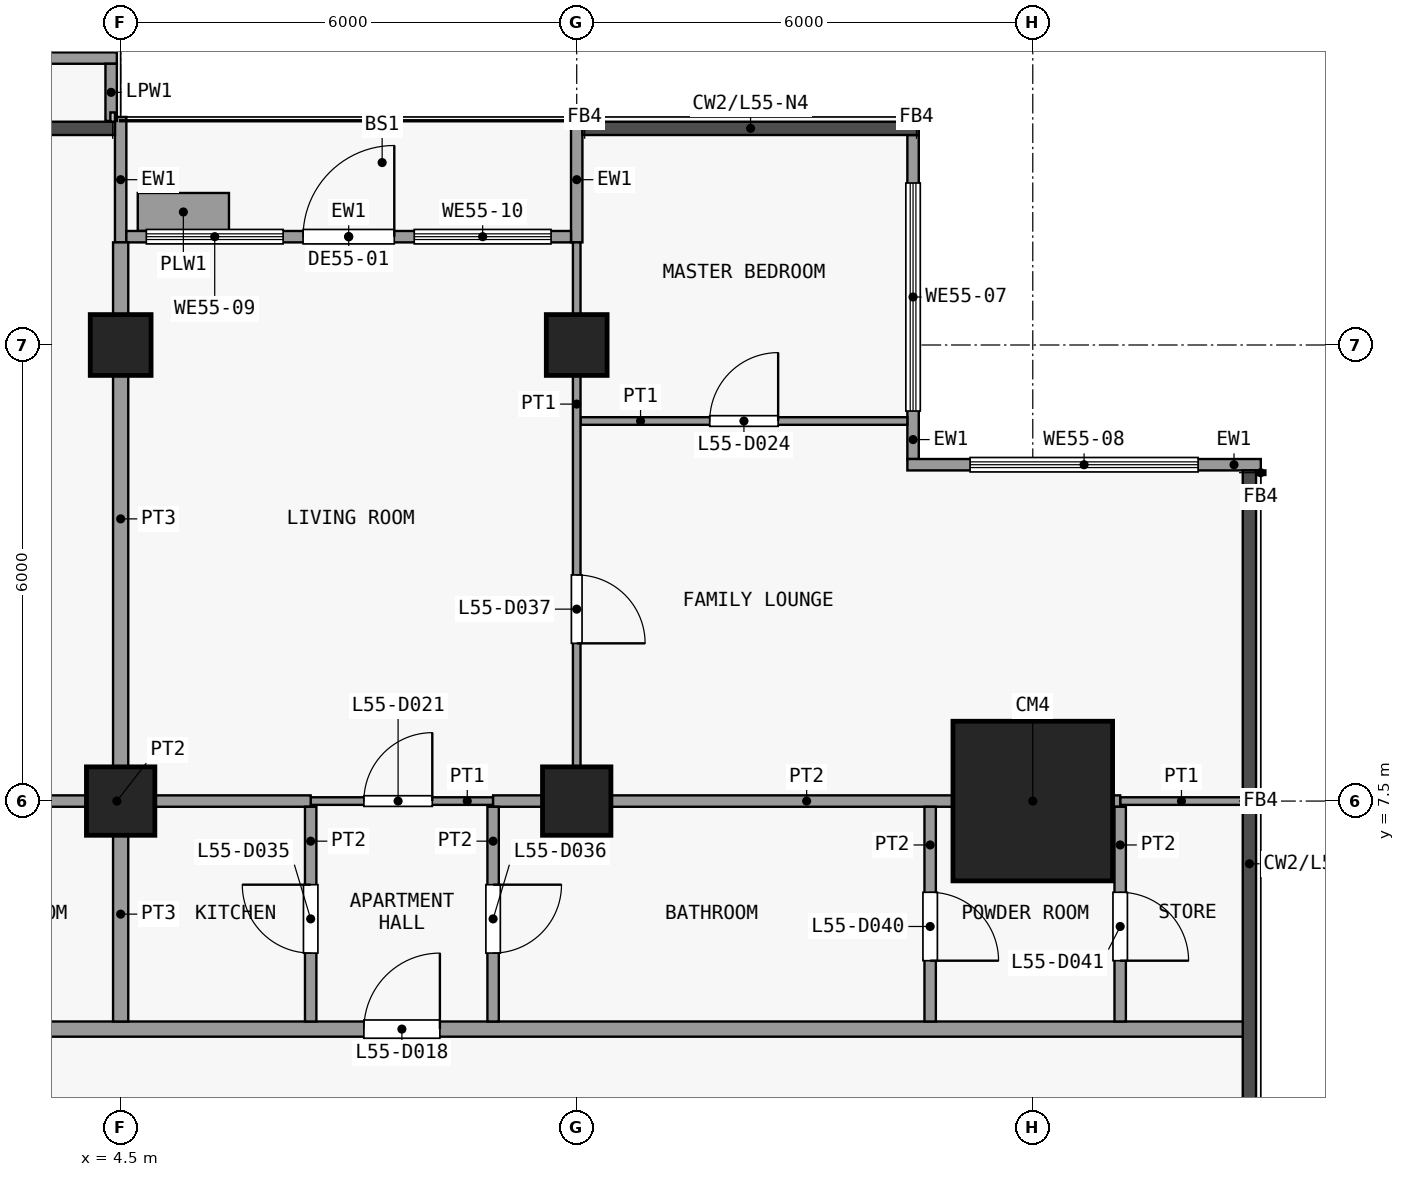
"""IFC4 building model, lengths in metres.
Left out: names, types, materials, properties, quantities, classifications, styles, units other than length and angle.
Written with IfcOpenShell. Run it as: python <this file> out.ifc"""

import sys

from ifc_helpers import new_model, si_unit, direction, frame, frame_2d, origin, origin_2d, place, context, subcontext, project, spatial, rectangle, extrude, element, fill, save


model = new_model("IFC4")
c1 = context("Model", 3, precision=1e-05, world=origin(), true_north=direction((0.0, 1.0)))
c2 = subcontext(c1, "Body", "Model", "MODEL_VIEW")
j1 = project(units=[si_unit("LENGTHUNIT", "METRE"), si_unit("PLANEANGLEUNIT", "RADIAN")], contexts=[c1])
p1 = place(None, origin())
s1 = spatial("IfcSite", under=j1, at=p1, CompositionType="ELEMENT")
p2 = place(p1, origin())
s2 = spatial("IfcBuilding", under=s1, at=p2, CompositionType="ELEMENT")
p3 = place(p2, frame((0.0, 0.0, 219.5)))
s3 = spatial("IfcBuildingStorey", under=s2, at=p3, CompositionType="ELEMENT", Elevation=219.5)
p4 = place(p3, frame((4.5, 7.5, 0.0), z_axis=(0.0, 0.0, 1.0), x_axis=(1.0, 0.0, 0.0)))
e1 = element("IfcColumn", 1, at=p4, inside=s3, PredefinedType="COLUMN", context=c2, shape_type="SweptSolid", body=[
    extrude(rectangle(XDim=0.9, YDim=0.9, at=origin_2d()), origin(), (0.0, 0.0, 1.0), 3.6),
])
p5 = place(p3, frame((4.5, 13.5, 0.0), z_axis=(0.0, 0.0, 1.0), x_axis=(1.0, 0.0, 0.0)))
e2 = element("IfcColumn", 2, at=p5, inside=s3, PredefinedType="COLUMN", context=c2, shape_type="SweptSolid", body=[
    extrude(rectangle(XDim=0.8, YDim=0.8, at=origin_2d()), origin(), (0.0, 0.0, 1.0), 3.6),
])
p6 = place(p3, frame((10.5, 7.5, 0.0), z_axis=(0.0, 0.0, 1.0), x_axis=(1.0, 0.0, 0.0)))
e3 = element("IfcColumn", 3, at=p6, inside=s3, PredefinedType="COLUMN", context=c2, shape_type="SweptSolid", body=[
    extrude(rectangle(XDim=0.9, YDim=0.9, at=origin_2d()), origin(), (0.0, 0.0, 1.0), 3.6),
])
p7 = place(p3, frame((10.5, 13.5, 0.0), z_axis=(0.0, 0.0, 1.0), x_axis=(1.0, 0.0, 0.0)))
e4 = element("IfcColumn", 4, at=p7, inside=s3, PredefinedType="COLUMN", context=c2, shape_type="SweptSolid", body=[
    extrude(rectangle(XDim=0.8, YDim=0.8, at=origin_2d()), origin(), (0.0, 0.0, 1.0), 3.6),
])
p8 = place(p3, frame((16.5, 7.5, 0.0), z_axis=(0.0, 0.0, 1.0), x_axis=(1.0, 0.0, 0.0)))
e5 = element("IfcColumn", 5, at=p8, inside=s3, PredefinedType="COLUMN", context=c2, shape_type="SweptSolid", body=[
    extrude(rectangle(XDim=2.1, YDim=2.1, at=origin_2d()), origin(), (0.0, 0.0, 1.0), 3.6),
])
p9 = place(p3, frame((14.925, 16.262, 0.0), z_axis=(0.0, 0.0, 1.0), x_axis=(0.0, -1.0, 0.0)))
e6 = element("IfcWall", 6, at=p9, inside=s3, PredefinedType="SOLIDWALL", context=c2, shape_type="SweptSolid", body=[
    extrude(rectangle(XDim=4.262, YDim=0.15, at=frame_2d((2.131, 0.0))), origin(), (0.0, 0.0, 1.0), 3.3),
])
p10 = place(p9, frame((0.631, 0.0, 0.9)))
e7 = element("IfcOpeningElement", 7, at=p10, cuts=e6, PredefinedType="OPENING", context=c2, shape_type="SweptSolid", body=[
    extrude(rectangle(XDim=3.0, YDim=2.4, at=frame_2d((1.5, 1.2))), frame((0.0, 0.085, 0.0), z_axis=(0.0, -1.0, 0.0), x_axis=(1.0, 0.0, 0.0)), (0.0, 0.0, 1.0), 0.17),
])
p11 = place(p3, frame((14.85, 11.925, 0.0), z_axis=(0.0, 0.0, 1.0), x_axis=(1.0, 0.0, 0.0)))
e8 = element("IfcWall", 8, at=p11, inside=s3, PredefinedType="SOLIDWALL", context=c2, shape_type="SweptSolid", body=[
    extrude(rectangle(XDim=4.65, YDim=0.15, at=frame_2d((2.325, 0.0))), origin(), (0.0, 0.0, 1.0), 3.3),
])
p12 = place(p11, frame((0.825, 0.0, 0.9)))
e9 = element("IfcOpeningElement", 9, at=p12, cuts=e8, PredefinedType="OPENING", context=c2, shape_type="SweptSolid", body=[
    extrude(rectangle(XDim=3.0, YDim=2.4, at=frame_2d((1.5, 1.2))), frame((0.0, 0.085, 0.0), z_axis=(0.0, -1.0, 0.0), x_axis=(1.0, 0.0, 0.0)), (0.0, 0.0, 1.0), 0.17),
])
for number, where, z_axis, x_axis in (
    (10, (4.5, 14.85, 0.0), (0.0, 0.0, 1.0), (0.0, 1.0, 0.0)),
    (11, (10.5, 14.85, 0.0), (0.0, 0.0, 1.0), (0.0, 1.0, 0.0)),
):
    element("IfcWall", number, at=place(p3, frame(where, z_axis=z_axis, x_axis=x_axis)), inside=s3, PredefinedType="SOLIDWALL", context=c2, shape_type="SweptSolid", body=[
        extrude(rectangle(XDim=1.65, YDim=0.15, at=frame_2d((0.825, 0.0))), origin(), (0.0, 0.0, 1.0), 3.3),
    ])
p13 = place(p3, frame((4.575, 14.925, 0.0), z_axis=(0.0, 0.0, 1.0), x_axis=(1.0, 0.0, 0.0)))
e12 = element("IfcWall", 12, at=p13, inside=s3, PredefinedType="SOLIDWALL", context=c2, shape_type="SweptSolid", body=[
    extrude(rectangle(XDim=5.85, YDim=0.15, at=frame_2d((2.925, 0.0))), origin(), (0.0, 0.0, 1.0), 3.3),
])
p14 = place(p13, frame((2.325, 0.0, 0.0)))
e13 = element("IfcOpeningElement", 13, at=p14, cuts=e12, PredefinedType="OPENING", context=c2, shape_type="SweptSolid", body=[
    extrude(rectangle(XDim=1.2, YDim=2.4, at=frame_2d((0.6, 1.2))), frame((0.0, 0.085, 0.0), z_axis=(0.0, -1.0, 0.0), x_axis=(1.0, 0.0, 0.0)), (0.0, 0.0, 1.0), 0.17),
])
p15 = place(p13, frame((0.262, 0.0, 0.9)))
e14 = element("IfcOpeningElement", 14, at=p15, cuts=e12, PredefinedType="OPENING", context=c2, shape_type="SweptSolid", body=[
    extrude(rectangle(XDim=1.8, YDim=2.1, at=frame_2d((0.9, 1.05))), frame((0.0, 0.085, 0.0), z_axis=(0.0, -1.0, 0.0), x_axis=(1.0, 0.0, 0.0)), (0.0, 0.0, 1.0), 0.17),
])
p16 = place(p13, frame((3.788, 0.0, 0.9)))
e15 = element("IfcOpeningElement", 15, at=p16, cuts=e12, PredefinedType="OPENING", context=c2, shape_type="SweptSolid", body=[
    extrude(rectangle(XDim=1.8, YDim=2.1, at=frame_2d((0.9, 1.05))), frame((0.0, 0.085, 0.0), z_axis=(0.0, -1.0, 0.0), x_axis=(1.0, 0.0, 0.0)), (0.0, 0.0, 1.0), 0.17),
])
p17 = place(p3, frame((4.725, 15.25, 0.0), z_axis=(0.0, 0.0, 1.0), x_axis=(1.0, 0.0, 0.0)))
e16 = element("IfcWall", 16, at=p17, inside=s3, PredefinedType="USERDEFINED", context=c2, shape_type="SweptSolid", body=[
    extrude(rectangle(XDim=1.2, YDim=0.5, at=frame_2d((0.6, 0.0))), origin(), (0.0, 0.0, 1.0), 0.9),
])
p18 = place(p3, frame((-4.552, 17.275, 0.0), z_axis=(0.0, 0.0, 1.0), x_axis=(1.0, 0.0, 0.0)))
e17 = element("IfcWall", 17, at=p18, inside=s3, PredefinedType="PARAPET", context=c2, shape_type="SweptSolid", body=[
    extrude(rectangle(XDim=9.002, YDim=0.15, at=frame_2d((4.501, 0.0))), origin(), (0.0, 0.0, 1.0), 1.15),
])
p19 = place(p3, frame((4.375, 17.2, 0.0), z_axis=(0.0, 0.0, 1.0), x_axis=(0.0, -1.0, 0.0)))
e18 = element("IfcWall", 18, at=p19, inside=s3, PredefinedType="PARAPET", context=c2, shape_type="SweptSolid", body=[
    extrude(rectangle(XDim=0.752, YDim=0.15, at=frame_2d((0.376, 0.0))), origin(), (0.0, 0.0, 1.0), 1.15),
])
p20 = place(p3, frame((-20.25, 4.5, 0.0), z_axis=(0.0, 0.0, 1.0), x_axis=(1.0, 0.0, 0.0)))
e19 = element("IfcWall", 19, at=p20, inside=s3, PredefinedType="PARTITIONING", context=c2, shape_type="SweptSolid", body=[
    extrude(rectangle(XDim=39.6, YDim=0.2, at=frame_2d((19.8, 0.0))), origin(), (0.0, 0.0, 1.0), 3.3),
])
p21 = place(p20, frame((5.45, 0.0, 0.0)))
e20 = element("IfcOpeningElement", 20, at=p21, cuts=e19, PredefinedType="OPENING", context=c2, shape_type="SweptSolid", body=[
    extrude(rectangle(XDim=1.0, YDim=2.1, at=frame_2d((0.5, 1.05))), frame((0.0, 0.11, 0.0), z_axis=(0.0, -1.0, 0.0), x_axis=(1.0, 0.0, 0.0)), (0.0, 0.0, 1.0), 0.22),
])
p22 = place(p20, frame((20.45, 0.0, 0.0)))
e21 = element("IfcOpeningElement", 21, at=p22, cuts=e19, PredefinedType="OPENING", context=c2, shape_type="SweptSolid", body=[
    extrude(rectangle(XDim=1.0, YDim=2.1, at=frame_2d((0.5, 1.05))), frame((0.0, 0.11, 0.0), z_axis=(0.0, -1.0, 0.0), x_axis=(1.0, 0.0, 0.0)), (0.0, 0.0, 1.0), 0.22),
])
p23 = place(p20, frame((27.95, 0.0, 0.0)))
e22 = element("IfcOpeningElement", 22, at=p23, cuts=e19, PredefinedType="OPENING", context=c2, shape_type="SweptSolid", body=[
    extrude(rectangle(XDim=1.0, YDim=2.1, at=frame_2d((0.5, 1.05))), frame((0.0, 0.11, 0.0), z_axis=(0.0, -1.0, 0.0), x_axis=(1.0, 0.0, 0.0)), (0.0, 0.0, 1.0), 0.22),
])
p24 = place(p3, frame((7.0, 7.5, 0.0), z_axis=(0.0, 0.0, 1.0), x_axis=(1.0, 0.0, 0.0)))
e23 = element("IfcWall", 23, at=p24, inside=s3, PredefinedType="PARTITIONING", context=c2, shape_type="SweptSolid", body=[
    extrude(rectangle(XDim=2.4, YDim=0.1, at=frame_2d((1.2, 0.0))), origin(), (0.0, 0.0, 1.0), 3.3),
])
p25 = place(p24, frame((0.7, 0.0, 0.0)))
e24 = element("IfcOpeningElement", 24, at=p25, cuts=e23, PredefinedType="OPENING", context=c2, shape_type="SweptSolid", body=[
    extrude(rectangle(XDim=0.9, YDim=2.1, at=frame_2d((0.45, 1.05))), frame((0.0, 0.06, 0.0), z_axis=(0.0, -1.0, 0.0), x_axis=(1.0, 0.0, 0.0)), (0.0, 0.0, 1.0), 0.12),
])
p26 = place(p3, frame((17.65, 7.5, 0.0), z_axis=(0.0, 0.0, 1.0), x_axis=(1.0, 0.0, 0.0)))
e25 = element("IfcWall", 25, at=p26, inside=s3, PredefinedType="PARTITIONING", context=c2, shape_type="SweptSolid", body=[
    extrude(rectangle(XDim=1.613, YDim=0.1, at=frame_2d((0.806, 0.0))), origin(), (0.0, 0.0, 1.0), 3.3),
])
p27 = place(p3, frame((1.9, 7.5, 0.0), z_axis=(0.0, 0.0, 1.0), x_axis=(1.0, 0.0, 0.0)))
e26 = element("IfcWall", 26, at=p27, inside=s3, PredefinedType="PARTITIONING", context=c2, shape_type="SweptSolid", body=[
    extrude(rectangle(XDim=5.1, YDim=0.15, at=frame_2d((2.55, 0.0))), origin(), (0.0, 0.0, 1.0), 3.3),
])
p28 = place(p3, frame((9.4, 7.5, 0.0), z_axis=(0.0, 0.0, 1.0), x_axis=(1.0, 0.0, 0.0)))
e27 = element("IfcWall", 27, at=p28, inside=s3, PredefinedType="PARTITIONING", context=c2, shape_type="SweptSolid", body=[
    extrude(rectangle(XDim=8.25, YDim=0.15, at=frame_2d((4.125, 0.0))), origin(), (0.0, 0.0, 1.0), 3.3),
])
p29 = place(p3, frame((10.55, 12.5, 0.0), z_axis=(0.0, 0.0, 1.0), x_axis=(1.0, 0.0, 0.0)))
e28 = element("IfcWall", 28, at=p29, inside=s3, PredefinedType="PARTITIONING", context=c2, shape_type="SweptSolid", body=[
    extrude(rectangle(XDim=4.3, YDim=0.1, at=frame_2d((2.15, 0.0))), origin(), (0.0, 0.0, 1.0), 3.3),
])
p30 = place(p29, frame((1.7, 0.0, 0.0)))
e29 = element("IfcOpeningElement", 29, at=p30, cuts=e28, PredefinedType="OPENING", context=c2, shape_type="SweptSolid", body=[
    extrude(rectangle(XDim=0.9, YDim=2.1, at=frame_2d((0.45, 1.05))), frame((0.0, 0.06, 0.0), z_axis=(0.0, -1.0, 0.0), x_axis=(1.0, 0.0, 0.0)), (0.0, 0.0, 1.0), 0.12),
])
p31 = place(p3, frame((4.5, 4.6, 0.0), z_axis=(0.0, 0.0, 1.0), x_axis=(0.0, 1.0, 0.0)))
e30 = element("IfcWall", 30, at=p31, inside=s3, PredefinedType="PARTITIONING", context=c2, shape_type="SweptSolid", body=[
    extrude(rectangle(XDim=2.825, YDim=0.2, at=frame_2d((1.413, 0.0))), origin(), (0.0, 0.0, 1.0), 3.3),
])
p32 = place(p3, frame((4.5, 7.575, 0.0), z_axis=(0.0, 0.0, 1.0), x_axis=(0.0, 1.0, 0.0)))
e31 = element("IfcWall", 31, at=p32, inside=s3, PredefinedType="PARTITIONING", context=c2, shape_type="SweptSolid", body=[
    extrude(rectangle(XDim=7.275, YDim=0.2, at=frame_2d((3.638, 0.0))), origin(), (0.0, 0.0, 1.0), 3.3),
])
p33 = place(p3, frame((7.0, 4.6, 0.0), z_axis=(0.0, 0.0, 1.0), x_axis=(0.0, 1.0, 0.0)))
e32 = element("IfcWall", 32, at=p33, inside=s3, PredefinedType="PARTITIONING", context=c2, shape_type="SweptSolid", body=[
    extrude(rectangle(XDim=2.825, YDim=0.15, at=frame_2d((1.413, 0.0))), origin(), (0.0, 0.0, 1.0), 3.3),
])
p34 = place(p33, frame((0.9, 0.0, 0.0)))
e33 = element("IfcOpeningElement", 33, at=p34, cuts=e32, PredefinedType="OPENING", context=c2, shape_type="SweptSolid", body=[
    extrude(rectangle(XDim=0.9, YDim=2.1, at=frame_2d((0.45, 1.05))), frame((0.0, 0.085, 0.0), z_axis=(0.0, -1.0, 0.0), x_axis=(1.0, 0.0, 0.0)), (0.0, 0.0, 1.0), 0.17),
])
p35 = place(p3, frame((9.4, 4.6, 0.0), z_axis=(0.0, 0.0, 1.0), x_axis=(0.0, 1.0, 0.0)))
e34 = element("IfcWall", 34, at=p35, inside=s3, PredefinedType="PARTITIONING", context=c2, shape_type="SweptSolid", body=[
    extrude(rectangle(XDim=2.825, YDim=0.15, at=frame_2d((1.413, 0.0))), origin(), (0.0, 0.0, 1.0), 3.3),
])
p36 = place(p35, frame((0.9, 0.0, 0.0)))
e35 = element("IfcOpeningElement", 35, at=p36, cuts=e34, PredefinedType="OPENING", context=c2, shape_type="SweptSolid", body=[
    extrude(rectangle(XDim=0.9, YDim=2.1, at=frame_2d((0.45, 1.05))), frame((0.0, 0.085, 0.0), z_axis=(0.0, -1.0, 0.0), x_axis=(1.0, 0.0, 0.0)), (0.0, 0.0, 1.0), 0.17),
])
p37 = place(p3, frame((10.5, 7.575, 0.0), z_axis=(0.0, 0.0, 1.0), x_axis=(0.0, 1.0, 0.0)))
e36 = element("IfcWall", 36, at=p37, inside=s3, PredefinedType="PARTITIONING", context=c2, shape_type="SweptSolid", body=[
    extrude(rectangle(XDim=7.275, YDim=0.1, at=frame_2d((3.638, 0.0))), origin(), (0.0, 0.0, 1.0), 3.3),
])
p38 = place(p37, frame((2.0, 0.0, 0.0)))
e37 = element("IfcOpeningElement", 37, at=p38, cuts=e36, PredefinedType="OPENING", context=c2, shape_type="SweptSolid", body=[
    extrude(rectangle(XDim=0.9, YDim=2.1, at=frame_2d((0.45, 1.05))), frame((0.0, 0.06, 0.0), z_axis=(0.0, -1.0, 0.0), x_axis=(1.0, 0.0, 0.0)), (0.0, 0.0, 1.0), 0.12),
])
p39 = place(p3, frame((15.15, 4.6, 0.0), z_axis=(0.0, 0.0, 1.0), x_axis=(0.0, 1.0, 0.0)))
e38 = element("IfcWall", 38, at=p39, inside=s3, PredefinedType="PARTITIONING", context=c2, shape_type="SweptSolid", body=[
    extrude(rectangle(XDim=2.825, YDim=0.15, at=frame_2d((1.413, 0.0))), origin(), (0.0, 0.0, 1.0), 3.3),
])
p40 = place(p39, frame((0.8, 0.0, 0.0)))
e39 = element("IfcOpeningElement", 39, at=p40, cuts=e38, PredefinedType="OPENING", context=c2, shape_type="SweptSolid", body=[
    extrude(rectangle(XDim=0.9, YDim=2.1, at=frame_2d((0.45, 1.05))), frame((0.0, 0.085, 0.0), z_axis=(0.0, -1.0, 0.0), x_axis=(1.0, 0.0, 0.0)), (0.0, 0.0, 1.0), 0.17),
])
p41 = place(p3, frame((17.65, 4.6, 0.0), z_axis=(0.0, 0.0, 1.0), x_axis=(0.0, 1.0, 0.0)))
e40 = element("IfcWall", 40, at=p41, inside=s3, PredefinedType="PARTITIONING", context=c2, shape_type="SweptSolid", body=[
    extrude(rectangle(XDim=2.825, YDim=0.15, at=frame_2d((1.413, 0.0))), origin(), (0.0, 0.0, 1.0), 3.3),
])
p42 = place(p41, frame((0.8, 0.0, 0.0)))
e41 = element("IfcOpeningElement", 41, at=p42, cuts=e40, PredefinedType="OPENING", context=c2, shape_type="SweptSolid", body=[
    extrude(rectangle(XDim=0.9, YDim=2.1, at=frame_2d((0.45, 1.05))), frame((0.0, 0.085, 0.0), z_axis=(0.0, -1.0, 0.0), x_axis=(1.0, 0.0, 0.0)), (0.0, 0.0, 1.0), 0.17),
])
p43 = place(p10, origin())
e42 = element("IfcWindow", 42, at=p43, inside=s3, PartitioningType="SINGLE_PANEL", PredefinedType="WINDOW", context=c2, shape_type="SweptSolid", body=[
    extrude(rectangle(XDim=3.0, YDim=2.4, at=frame_2d((1.5, 1.2))), frame((0.0, 0.03, 0.0), z_axis=(0.0, -1.0, 0.0), x_axis=(1.0, 0.0, 0.0)), (0.0, 0.0, 1.0), 0.06),
])
fill(e7, e42)
p44 = place(p12, origin())
e43 = element("IfcWindow", 43, at=p44, inside=s3, PartitioningType="SINGLE_PANEL", PredefinedType="WINDOW", context=c2, shape_type="SweptSolid", body=[
    extrude(rectangle(XDim=3.0, YDim=2.4, at=frame_2d((1.5, 1.2))), frame((0.0, 0.03, 0.0), z_axis=(0.0, -1.0, 0.0), x_axis=(1.0, 0.0, 0.0)), (0.0, 0.0, 1.0), 0.06),
])
fill(e9, e43)
p45 = place(p14, origin())
e44 = element("IfcDoor", 44, at=p45, inside=s3, OperationType="SINGLE_SWING_RIGHT", PredefinedType="DOOR", context=c2, shape_type="SweptSolid", body=[
    extrude(rectangle(XDim=1.2, YDim=2.4, at=frame_2d((0.6, 1.2))), frame((0.0, 0.025, 0.0), z_axis=(0.0, -1.0, 0.0), x_axis=(1.0, 0.0, 0.0)), (0.0, 0.0, 1.0), 0.05),
])
fill(e13, e44)
p46 = place(p15, origin())
e45 = element("IfcWindow", 45, at=p46, inside=s3, PartitioningType="SINGLE_PANEL", PredefinedType="WINDOW", context=c2, shape_type="SweptSolid", body=[
    extrude(rectangle(XDim=1.8, YDim=2.1, at=frame_2d((0.9, 1.05))), frame((0.0, 0.03, 0.0), z_axis=(0.0, -1.0, 0.0), x_axis=(1.0, 0.0, 0.0)), (0.0, 0.0, 1.0), 0.06),
])
fill(e14, e45)
p47 = place(p16, origin())
e46 = element("IfcWindow", 46, at=p47, inside=s3, PartitioningType="SINGLE_PANEL", PredefinedType="WINDOW", context=c2, shape_type="SweptSolid", body=[
    extrude(rectangle(XDim=1.8, YDim=2.1, at=frame_2d((0.9, 1.05))), frame((0.0, 0.03, 0.0), z_axis=(0.0, -1.0, 0.0), x_axis=(1.0, 0.0, 0.0)), (0.0, 0.0, 1.0), 0.06),
])
fill(e15, e46)
p48 = place(p23, origin())
e47 = element("IfcDoor", 47, at=p48, inside=s3, OperationType="SINGLE_SWING_LEFT", PredefinedType="DOOR", context=c2, shape_type="SweptSolid", body=[
    extrude(rectangle(XDim=1.0, YDim=2.1, at=frame_2d((0.5, 1.05))), frame((0.0, 0.025, 0.0), z_axis=(0.0, -1.0, 0.0), x_axis=(1.0, 0.0, 0.0)), (0.0, 0.0, 1.0), 0.05),
])
fill(e22, e47)
p49 = place(p25, origin())
e48 = element("IfcDoor", 48, at=p49, inside=s3, OperationType="SINGLE_SWING_LEFT", PredefinedType="DOOR", context=c2, shape_type="SweptSolid", body=[
    extrude(rectangle(XDim=0.9, YDim=2.1, at=frame_2d((0.45, 1.05))), frame((0.0, 0.025, 0.0), z_axis=(0.0, -1.0, 0.0), x_axis=(1.0, 0.0, 0.0)), (0.0, 0.0, 1.0), 0.05),
])
fill(e24, e48)
p50 = place(p30, origin())
e49 = element("IfcDoor", 49, at=p50, inside=s3, OperationType="SINGLE_SWING_LEFT", PredefinedType="DOOR", context=c2, shape_type="SweptSolid", body=[
    extrude(rectangle(XDim=0.9, YDim=2.1, at=frame_2d((0.45, 1.05))), frame((0.0, 0.025, 0.0), z_axis=(0.0, -1.0, 0.0), x_axis=(1.0, 0.0, 0.0)), (0.0, 0.0, 1.0), 0.05),
])
fill(e29, e49)
p51 = place(p34, origin())
e50 = element("IfcDoor", 50, at=p51, inside=s3, OperationType="SINGLE_SWING_LEFT", PredefinedType="DOOR", context=c2, shape_type="SweptSolid", body=[
    extrude(rectangle(XDim=0.9, YDim=2.1, at=frame_2d((0.45, 1.05))), frame((0.0, 0.025, 0.0), z_axis=(0.0, -1.0, 0.0), x_axis=(1.0, 0.0, 0.0)), (0.0, 0.0, 1.0), 0.05),
])
fill(e33, e50)
p52 = place(p36, origin())
e51 = element("IfcDoor", 51, at=p52, inside=s3, OperationType="SINGLE_SWING_RIGHT", PredefinedType="DOOR", context=c2, shape_type="SweptSolid", body=[
    extrude(rectangle(XDim=0.9, YDim=2.1, at=frame_2d((0.45, 1.05))), frame((0.0, 0.025, 0.0), z_axis=(0.0, -1.0, 0.0), x_axis=(1.0, 0.0, 0.0)), (0.0, 0.0, 1.0), 0.05),
])
fill(e35, e51)
p53 = place(p38, origin())
e52 = element("IfcDoor", 52, at=p53, inside=s3, OperationType="SINGLE_SWING_LEFT", PredefinedType="DOOR", context=c2, shape_type="SweptSolid", body=[
    extrude(rectangle(XDim=0.9, YDim=2.1, at=frame_2d((0.45, 1.05))), frame((0.0, 0.025, 0.0), z_axis=(0.0, -1.0, 0.0), x_axis=(1.0, 0.0, 0.0)), (0.0, 0.0, 1.0), 0.05),
])
fill(e37, e52)
p54 = place(p40, origin())
e53 = element("IfcDoor", 53, at=p54, inside=s3, OperationType="SINGLE_SWING_LEFT", PredefinedType="DOOR", context=c2, shape_type="SweptSolid", body=[
    extrude(rectangle(XDim=0.9, YDim=2.1, at=frame_2d((0.45, 1.05))), frame((0.0, 0.025, 0.0), z_axis=(0.0, -1.0, 0.0), x_axis=(1.0, 0.0, 0.0)), (0.0, 0.0, 1.0), 0.05),
])
fill(e39, e53)
p55 = place(p42, origin())
e54 = element("IfcDoor", 54, at=p55, inside=s3, OperationType="SINGLE_SWING_LEFT", PredefinedType="DOOR", context=c2, shape_type="SweptSolid", body=[
    extrude(rectangle(XDim=0.9, YDim=2.1, at=frame_2d((0.45, 1.05))), frame((0.0, 0.025, 0.0), z_axis=(0.0, -1.0, 0.0), x_axis=(1.0, 0.0, 0.0)), (0.0, 0.0, 1.0), 0.05),
])
fill(e41, e54)
save(model, sys.argv[1])
